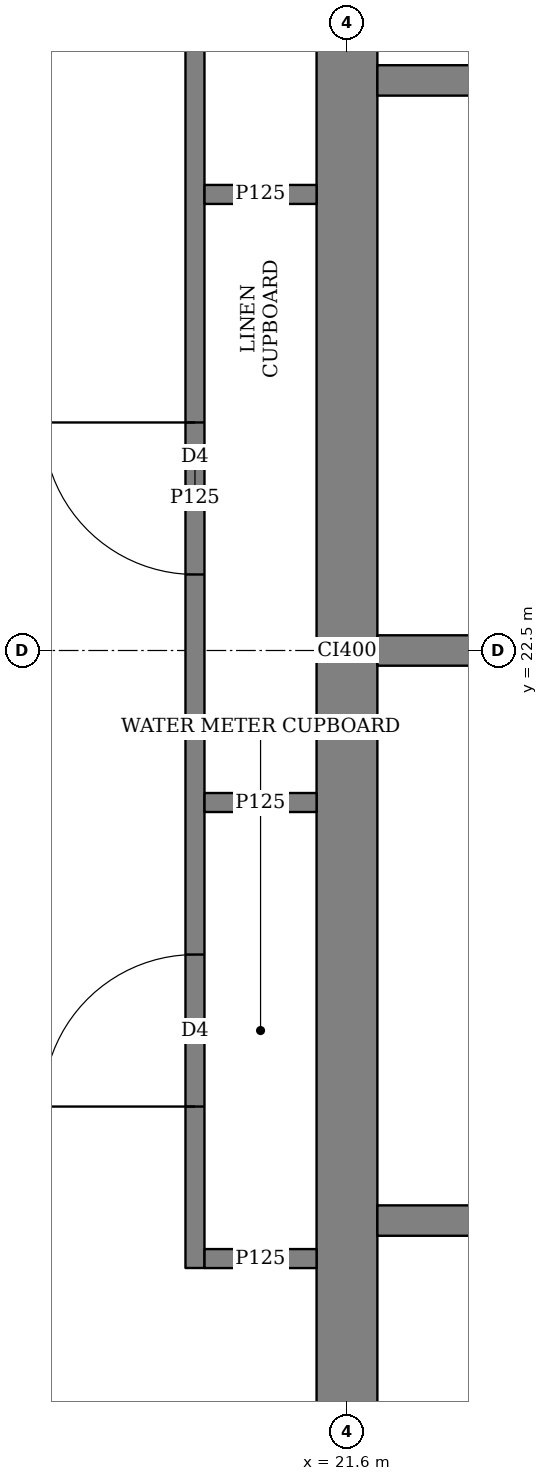
"""IFC4 building model, lengths in metres.
Left out: names, types, materials, properties, quantities, classifications, styles, units other than length and angle.
Written with IfcOpenShell. Run it as: python <this file> out.ifc"""

import sys

from ifc_helpers import new_model, si_unit, direction, frame, frame_2d, origin, place, context, subcontext, project, spatial, rectangle, extrude, element, fill, save


model = new_model("IFC4")
c1 = context("Model", 3, precision=1e-05, world=origin(), true_north=direction((0.0, 1.0)))
c2 = subcontext(c1, "Body", "Model", "MODEL_VIEW")
j1 = project(units=[si_unit("LENGTHUNIT", "METRE"), si_unit("PLANEANGLEUNIT", "RADIAN")], contexts=[c1])
p1 = place(None, origin())
s1 = spatial("IfcSite", under=j1, at=p1, CompositionType="ELEMENT")
p2 = place(p1, origin())
s2 = spatial("IfcBuilding", under=s1, at=p2, CompositionType="ELEMENT")
p3 = place(p2, frame((0.0, 0.0, 53.75)))
s3 = spatial("IfcBuildingStorey", under=s2, at=p3, CompositionType="ELEMENT", Elevation=53.75)
p4 = place(p3, frame((21.6, 15.45, 0.0), z_axis=(0.0, 0.0, 1.0), x_axis=(0.0, 1.0, 0.0)))
e1 = element("IfcWall", 1, at=p4, inside=s3, PredefinedType="SHEAR", context=c2, shape_type="SweptSolid", body=[
    extrude(rectangle(XDim=14.1, YDim=0.4, at=frame_2d((7.05, 0.0))), origin(), (0.0, 0.0, 1.0), 3.75),
])
p5 = place(p3, frame((20.6, 18.438, 0.0), z_axis=(0.0, 0.0, 1.0), x_axis=(0.0, 1.0, 0.0)))
e2 = element("IfcWall", 2, at=p5, inside=s3, PredefinedType="PARTITIONING", context=c2, shape_type="SweptSolid", body=[
    extrude(rectangle(XDim=10.124, YDim=0.125, at=frame_2d((5.062, 0.0))), origin(), (0.0, 0.0, 1.0), 3.5),
])
p6 = place(p5, frame((1.062, 0.0, 0.0)))
e3 = element("IfcOpeningElement", 3, at=p6, cuts=e2, PredefinedType="OPENING", context=c2, shape_type="SweptSolid", body=[
    extrude(rectangle(XDim=1.0, YDim=2.1, at=frame_2d((0.5, 1.05))), frame((0.0, 0.073, 0.0), z_axis=(0.0, -1.0, 0.0), x_axis=(1.0, 0.0, 0.0)), (0.0, 0.0, 1.0), 0.145),
])
p7 = place(p5, frame((4.562, 0.0, 0.0)))
e4 = element("IfcOpeningElement", 4, at=p7, cuts=e2, PredefinedType="OPENING", context=c2, shape_type="SweptSolid", body=[
    extrude(rectangle(XDim=1.0, YDim=2.1, at=frame_2d((0.5, 1.05))), frame((0.0, 0.073, 0.0), z_axis=(0.0, -1.0, 0.0), x_axis=(1.0, 0.0, 0.0)), (0.0, 0.0, 1.0), 0.145),
])
p8 = place(p5, frame((8.062, 0.0, 0.0)))
e5 = element("IfcOpeningElement", 5, at=p8, cuts=e2, PredefinedType="OPENING", context=c2, shape_type="SweptSolid", body=[
    extrude(rectangle(XDim=1.0, YDim=2.1, at=frame_2d((0.5, 1.05))), frame((0.0, 0.073, 0.0), z_axis=(0.0, -1.0, 0.0), x_axis=(1.0, 0.0, 0.0)), (0.0, 0.0, 1.0), 0.145),
])
for number, where, z_axis, x_axis in (
    (6, (20.663, 18.5, 0.0), (0.0, 0.0, 1.0), (1.0, 0.0, 0.0)),
    (7, (20.663, 21.5, 0.0), (0.0, 0.0, 1.0), (1.0, 0.0, 0.0)),
    (8, (20.663, 25.5, 0.0), (0.0, 0.0, 1.0), (1.0, 0.0, 0.0)),
):
    element("IfcWall", number, at=place(p3, frame(where, z_axis=z_axis, x_axis=x_axis)), inside=s3, PredefinedType="PARTITIONING", context=c2, shape_type="SweptSolid", body=[
        extrude(rectangle(XDim=0.737, YDim=0.125, at=frame_2d((0.368, 0.0))), origin(), (0.0, 0.0, 1.0), 3.5),
    ])
for number, where, z_axis, x_axis in (
    (9, (21.8, 18.75, 0.0), (0.0, 0.0, 1.0), (1.0, 0.0, 0.0)),
    (10, (21.8, 22.5, 0.0), (0.0, 0.0, 1.0), (1.0, 0.0, 0.0)),
    (11, (21.8, 26.25, 0.0), (0.0, 0.0, 1.0), (1.0, 0.0, 0.0)),
):
    element("IfcWall", number, at=place(p3, frame(where, z_axis=z_axis, x_axis=x_axis)), inside=s3, PredefinedType="SOLIDWALL", context=c2, shape_type="SweptSolid", body=[
        extrude(rectangle(XDim=2.2, YDim=0.2, at=frame_2d((1.1, 0.0))), origin(), (0.0, 0.0, 1.0), 3.5),
    ])
p9 = place(p6, origin())
e12 = element("IfcDoor", 12, at=p9, inside=s3, OperationType="SINGLE_SWING_LEFT", PredefinedType="DOOR", context=c2, shape_type="SweptSolid", body=[
    extrude(rectangle(XDim=1.0, YDim=2.1, at=frame_2d((0.5, 1.05))), frame((0.0, 0.025, 0.0), z_axis=(0.0, -1.0, 0.0), x_axis=(1.0, 0.0, 0.0)), (0.0, 0.0, 1.0), 0.05),
])
fill(e3, e12)
p10 = place(p7, origin())
e13 = element("IfcDoor", 13, at=p10, inside=s3, OperationType="SINGLE_SWING_RIGHT", PredefinedType="DOOR", context=c2, shape_type="SweptSolid", body=[
    extrude(rectangle(XDim=1.0, YDim=2.1, at=frame_2d((0.5, 1.05))), frame((0.0, 0.025, 0.0), z_axis=(0.0, -1.0, 0.0), x_axis=(1.0, 0.0, 0.0)), (0.0, 0.0, 1.0), 0.05),
])
fill(e4, e13)
save(model, sys.argv[1])
